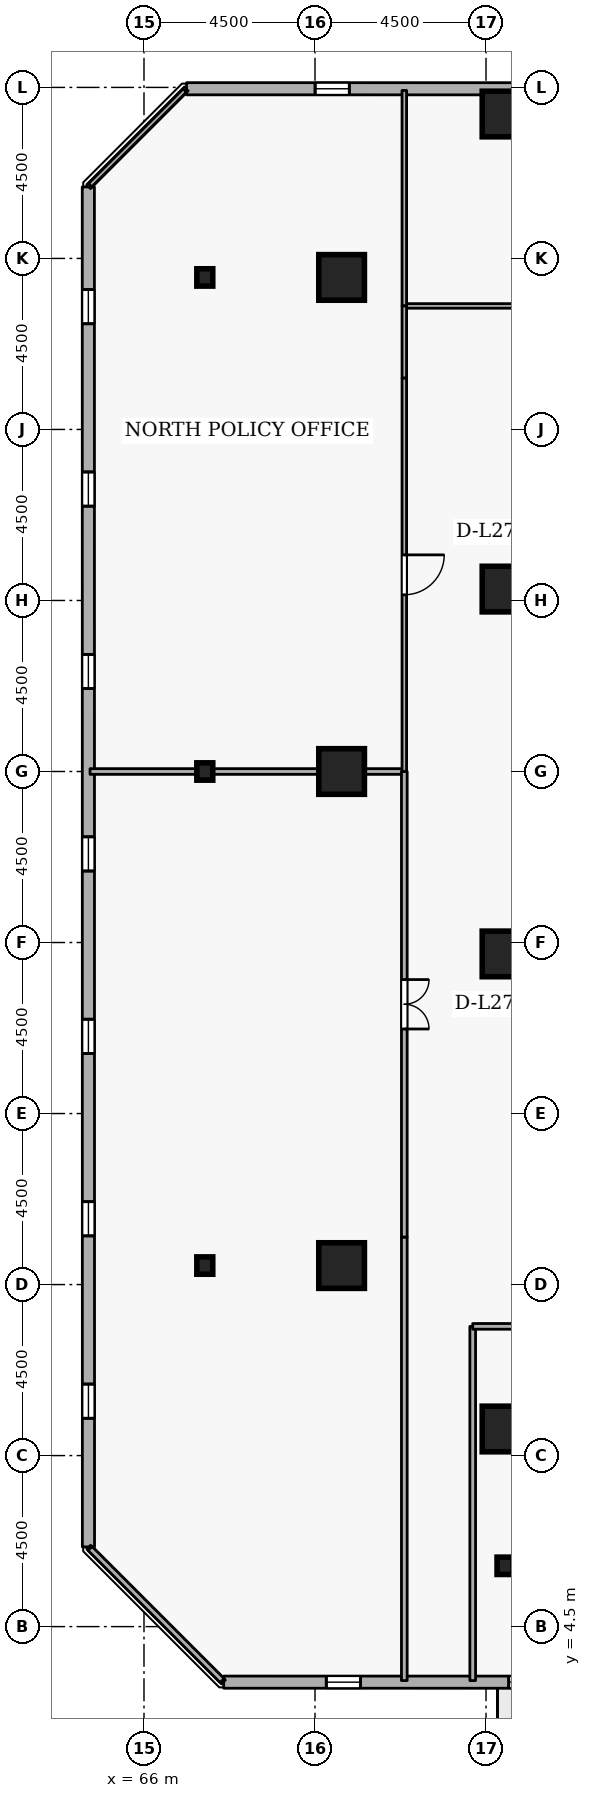
"""IFC4 building model, lengths in metres.
Left out: names, types, materials, properties, quantities, classifications, styles, units other than length and angle.
Written with IfcOpenShell. Run it as: python <this file> out.ifc"""

import sys

from ifc_helpers import new_model, si_unit, direction, frame, frame_2d, origin, origin_2d, place, context, subcontext, project, spatial, rectangle, i_section, extrude, element, fill, save


model = new_model("IFC4")
c1 = context("Model", 3, precision=1e-05, world=origin(), true_north=direction((0.0, 1.0)))
c2 = subcontext(c1, "Body", "Model", "MODEL_VIEW")
j1 = project(units=[si_unit("LENGTHUNIT", "METRE"), si_unit("PLANEANGLEUNIT", "RADIAN")], contexts=[c1])
p1 = place(None, origin())
s1 = spatial("IfcSite", under=j1, at=p1, CompositionType="ELEMENT")
p2 = place(p1, origin())
s2 = spatial("IfcBuilding", under=s1, at=p2, CompositionType="ELEMENT")
p3 = place(p2, frame((0.0, 0.0, 105.3)))
s3 = spatial("IfcBuildingStorey", under=s2, at=p3, CompositionType="ELEMENT", Elevation=105.3)
for number, where, z_axis, x_axis in (
    (1, (75.5, 44.3, 0.0), (0.0, 0.0, 1.0), (1.0, 0.0, 0.0)),
    (2, (71.2, 14.0, 0.0), (0.0, 0.0, 1.0), (1.0, 0.0, 0.0)),
    (3, (71.2, 27.0, 0.0), (0.0, 0.0, 1.0), (1.0, 0.0, 0.0)),
    (4, (71.2, 40.0, 0.0), (0.0, 0.0, 1.0), (1.0, 0.0, 0.0)),
    (5, (75.5, 9.7, 0.0), (0.0, 0.0, 1.0), (1.0, 0.0, 0.0)),
    (6, (75.5, 22.2, 0.0), (0.0, 0.0, 1.0), (1.0, 0.0, 0.0)),
    (7, (75.5, 31.8, 0.0), (0.0, 0.0, 1.0), (1.0, 0.0, 0.0)),
):
    element("IfcColumn", number, at=place(p3, frame(where, z_axis=z_axis, x_axis=x_axis)), inside=s3, PredefinedType="COLUMN", context=c2, shape_type="SweptSolid", body=[
        extrude(rectangle(XDim=1.2, YDim=1.2, at=origin_2d()), origin(), (0.0, 0.0, 1.0), 3.6),
    ])
for number, where, z_axis, x_axis in (
    (8, (67.6, 14.0, 0.0), (0.0, 0.0, 1.0), (1.0, 0.0, 0.0)),
    (9, (67.6, 27.0, 0.0), (0.0, 0.0, 1.0), (1.0, 0.0, 0.0)),
    (10, (67.6, 40.0, 0.0), (0.0, 0.0, 1.0), (1.0, 0.0, 0.0)),
    (11, (75.5, 6.1, 0.0), (0.0, 0.0, 1.0), (1.0, 0.0, 0.0)),
):
    element("IfcColumn", number, at=place(p3, frame(where, z_axis=z_axis, x_axis=x_axis)), inside=s3, PredefinedType="COLUMN", context=c2, shape_type="SweptSolid", body=[
        extrude(i_section(OverallWidth=0.418, OverallDepth=0.456, WebThickness=0.042, FlangeThickness=0.067, FilletRadius=0.015, at=origin_2d()), origin(), (0.0, 0.0, 1.0), 3.6),
    ])
p4 = place(p3, frame((68.097, 3.039, 0.0), z_axis=(0.0, 0.0, 1.0), x_axis=(0.999999996067, -8.8693006e-05, 0.0)))
e12 = element("IfcWall", 12, at=p4, inside=s3, PredefinedType="STANDARD", context=c2, shape_type="SweptSolid", body=[
    extrude(rectangle(XDim=35.784, YDim=0.32, at=frame_2d((17.892, 0.0))), origin(), (0.0, 0.0, 1.0), 2.7),
])
p5 = place(p4, frame((18.792, 0.0, 0.0)))
e13 = element("IfcOpeningElement", 13, at=p5, cuts=e12, PredefinedType="OPENING", context=c2, shape_type="SweptSolid", body=[
    extrude(rectangle(XDim=1.0, YDim=2.08, at=frame_2d((0.5, 1.04))), frame((0.0, 0.17, 0.0), z_axis=(0.0, -1.0, 0.0), x_axis=(1.0, 0.0, 0.0)), (0.0, 0.0, 1.0), 0.34),
])
p6 = place(p4, frame((2.7, 0.0, 0.72)))
e14 = element("IfcOpeningElement", 14, at=p6, cuts=e12, PredefinedType="OPENING", context=c2, shape_type="SweptSolid", body=[
    extrude(rectangle(XDim=0.9, YDim=1.75, at=frame_2d((0.45, 0.875))), frame((0.0, 0.17, 0.0), z_axis=(0.0, -1.0, 0.0), x_axis=(1.0, 0.0, 0.0)), (0.0, 0.0, 1.0), 0.34),
])
p7 = place(p4, frame((7.5, 0.0, 0.72)))
e15 = element("IfcOpeningElement", 15, at=p7, cuts=e12, PredefinedType="OPENING", context=c2, shape_type="SweptSolid", body=[
    extrude(rectangle(XDim=0.9, YDim=1.75, at=frame_2d((0.45, 0.875))), frame((0.0, 0.17, 0.0), z_axis=(0.0, -1.0, 0.0), x_axis=(1.0, 0.0, 0.0)), (0.0, 0.0, 1.0), 0.34),
])
p8 = place(p4, frame((12.3, 0.0, 0.72)))
e16 = element("IfcOpeningElement", 16, at=p8, cuts=e12, PredefinedType="OPENING", context=c2, shape_type="SweptSolid", body=[
    extrude(rectangle(XDim=0.9, YDim=1.75, at=frame_2d((0.45, 0.875))), frame((0.0, 0.17, 0.0), z_axis=(0.0, -1.0, 0.0), x_axis=(1.0, 0.0, 0.0)), (0.0, 0.0, 1.0), 0.34),
])
p9 = place(p4, frame((17.1, 0.0, 0.72)))
e17 = element("IfcOpeningElement", 17, at=p9, cuts=e12, PredefinedType="OPENING", context=c2, shape_type="SweptSolid", body=[
    extrude(rectangle(XDim=0.9, YDim=1.75, at=frame_2d((0.45, 0.875))), frame((0.0, 0.17, 0.0), z_axis=(0.0, -1.0, 0.0), x_axis=(1.0, 0.0, 0.0)), (0.0, 0.0, 1.0), 0.34),
])
p10 = place(p4, frame((21.9, 0.0, 0.72)))
e18 = element("IfcOpeningElement", 18, at=p10, cuts=e12, PredefinedType="OPENING", context=c2, shape_type="SweptSolid", body=[
    extrude(rectangle(XDim=0.9, YDim=1.75, at=frame_2d((0.45, 0.875))), frame((0.0, 0.17, 0.0), z_axis=(0.0, -1.0, 0.0), x_axis=(1.0, 0.0, 0.0)), (0.0, 0.0, 1.0), 0.34),
])
p11 = place(p4, frame((26.7, 0.0, 0.72)))
e19 = element("IfcOpeningElement", 19, at=p11, cuts=e12, PredefinedType="OPENING", context=c2, shape_type="SweptSolid", body=[
    extrude(rectangle(XDim=0.9, YDim=1.75, at=frame_2d((0.45, 0.875))), frame((0.0, 0.17, 0.0), z_axis=(0.0, -1.0, 0.0), x_axis=(1.0, 0.0, 0.0)), (0.0, 0.0, 1.0), 0.34),
])
p12 = place(p4, frame((31.5, 0.0, 0.72)))
e20 = element("IfcOpeningElement", 20, at=p12, cuts=e12, PredefinedType="OPENING", context=c2, shape_type="SweptSolid", body=[
    extrude(rectangle(XDim=0.9, YDim=1.75, at=frame_2d((0.45, 0.875))), frame((0.0, 0.17, 0.0), z_axis=(0.0, -1.0, 0.0), x_axis=(1.0, 0.0, 0.0)), (0.0, 0.0, 1.0), 0.34),
])
p13 = place(p3, frame((102.903, 44.961, 0.0), z_axis=(0.0, 0.0, 1.0), x_axis=(-0.999999996067, 8.8693006e-05, 0.0)))
e21 = element("IfcWall", 21, at=p13, inside=s3, PredefinedType="STANDARD", context=c2, shape_type="SweptSolid", body=[
    extrude(rectangle(XDim=35.784, YDim=0.32, at=frame_2d((17.892, 0.0))), origin(), (0.0, 0.0, 1.0), 2.7),
])
p14 = place(p13, frame((2.7, 0.0, 0.72)))
e22 = element("IfcOpeningElement", 22, at=p14, cuts=e21, PredefinedType="OPENING", context=c2, shape_type="SweptSolid", body=[
    extrude(rectangle(XDim=0.9, YDim=1.75, at=frame_2d((0.45, 0.875))), frame((0.0, 0.17, 0.0), z_axis=(0.0, -1.0, 0.0), x_axis=(1.0, 0.0, 0.0)), (0.0, 0.0, 1.0), 0.34),
])
p15 = place(p13, frame((7.5, 0.0, 0.72)))
e23 = element("IfcOpeningElement", 23, at=p15, cuts=e21, PredefinedType="OPENING", context=c2, shape_type="SweptSolid", body=[
    extrude(rectangle(XDim=0.9, YDim=1.75, at=frame_2d((0.45, 0.875))), frame((0.0, 0.17, 0.0), z_axis=(0.0, -1.0, 0.0), x_axis=(1.0, 0.0, 0.0)), (0.0, 0.0, 1.0), 0.34),
])
p16 = place(p13, frame((12.3, 0.0, 0.72)))
e24 = element("IfcOpeningElement", 24, at=p16, cuts=e21, PredefinedType="OPENING", context=c2, shape_type="SweptSolid", body=[
    extrude(rectangle(XDim=0.9, YDim=1.75, at=frame_2d((0.45, 0.875))), frame((0.0, 0.17, 0.0), z_axis=(0.0, -1.0, 0.0), x_axis=(1.0, 0.0, 0.0)), (0.0, 0.0, 1.0), 0.34),
])
p17 = place(p13, frame((17.1, 0.0, 0.72)))
e25 = element("IfcOpeningElement", 25, at=p17, cuts=e21, PredefinedType="OPENING", context=c2, shape_type="SweptSolid", body=[
    extrude(rectangle(XDim=0.9, YDim=1.75, at=frame_2d((0.45, 0.875))), frame((0.0, 0.17, 0.0), z_axis=(0.0, -1.0, 0.0), x_axis=(1.0, 0.0, 0.0)), (0.0, 0.0, 1.0), 0.34),
])
p18 = place(p13, frame((21.9, 0.0, 0.72)))
e26 = element("IfcOpeningElement", 26, at=p18, cuts=e21, PredefinedType="OPENING", context=c2, shape_type="SweptSolid", body=[
    extrude(rectangle(XDim=0.9, YDim=1.75, at=frame_2d((0.45, 0.875))), frame((0.0, 0.17, 0.0), z_axis=(0.0, -1.0, 0.0), x_axis=(1.0, 0.0, 0.0)), (0.0, 0.0, 1.0), 0.34),
])
p19 = place(p13, frame((31.5, 0.0, 0.72)))
e27 = element("IfcOpeningElement", 27, at=p19, cuts=e21, PredefinedType="OPENING", context=c2, shape_type="SweptSolid", body=[
    extrude(rectangle(XDim=0.9, YDim=1.75, at=frame_2d((0.45, 0.875))), frame((0.0, 0.17, 0.0), z_axis=(0.0, -1.0, 0.0), x_axis=(1.0, 0.0, 0.0)), (0.0, 0.0, 1.0), 0.34),
])
p20 = place(p3, frame((64.535, 42.381, 0.0), z_axis=(0.0, 0.0, 1.0), x_axis=(8.8693006e-05, -0.999999996067, 0.0)))
e28 = element("IfcWall", 28, at=p20, inside=s3, PredefinedType="STANDARD", context=c2, shape_type="SweptSolid", body=[
    extrude(rectangle(XDim=35.784, YDim=0.32, at=frame_2d((17.892, 0.0))), origin(), (0.0, 0.0, 1.0), 2.7),
])
p21 = place(p20, frame((2.7, 0.0, 0.72)))
e29 = element("IfcOpeningElement", 29, at=p21, cuts=e28, PredefinedType="OPENING", context=c2, shape_type="SweptSolid", body=[
    extrude(rectangle(XDim=0.9, YDim=1.75, at=frame_2d((0.45, 0.875))), frame((0.0, 0.17, 0.0), z_axis=(0.0, -1.0, 0.0), x_axis=(1.0, 0.0, 0.0)), (0.0, 0.0, 1.0), 0.34),
])
p22 = place(p20, frame((7.5, 0.0, 0.72)))
e30 = element("IfcOpeningElement", 30, at=p22, cuts=e28, PredefinedType="OPENING", context=c2, shape_type="SweptSolid", body=[
    extrude(rectangle(XDim=0.9, YDim=1.75, at=frame_2d((0.45, 0.875))), frame((0.0, 0.17, 0.0), z_axis=(0.0, -1.0, 0.0), x_axis=(1.0, 0.0, 0.0)), (0.0, 0.0, 1.0), 0.34),
])
p23 = place(p20, frame((12.3, 0.0, 0.72)))
e31 = element("IfcOpeningElement", 31, at=p23, cuts=e28, PredefinedType="OPENING", context=c2, shape_type="SweptSolid", body=[
    extrude(rectangle(XDim=0.9, YDim=1.75, at=frame_2d((0.45, 0.875))), frame((0.0, 0.17, 0.0), z_axis=(0.0, -1.0, 0.0), x_axis=(1.0, 0.0, 0.0)), (0.0, 0.0, 1.0), 0.34),
])
p24 = place(p20, frame((17.1, 0.0, 0.72)))
e32 = element("IfcOpeningElement", 32, at=p24, cuts=e28, PredefinedType="OPENING", context=c2, shape_type="SweptSolid", body=[
    extrude(rectangle(XDim=0.9, YDim=1.75, at=frame_2d((0.45, 0.875))), frame((0.0, 0.17, 0.0), z_axis=(0.0, -1.0, 0.0), x_axis=(1.0, 0.0, 0.0)), (0.0, 0.0, 1.0), 0.34),
])
p25 = place(p20, frame((21.9, 0.0, 0.72)))
e33 = element("IfcOpeningElement", 33, at=p25, cuts=e28, PredefinedType="OPENING", context=c2, shape_type="SweptSolid", body=[
    extrude(rectangle(XDim=0.9, YDim=1.75, at=frame_2d((0.45, 0.875))), frame((0.0, 0.17, 0.0), z_axis=(0.0, -1.0, 0.0), x_axis=(1.0, 0.0, 0.0)), (0.0, 0.0, 1.0), 0.34),
])
p26 = place(p20, frame((26.7, 0.0, 0.72)))
e34 = element("IfcOpeningElement", 34, at=p26, cuts=e28, PredefinedType="OPENING", context=c2, shape_type="SweptSolid", body=[
    extrude(rectangle(XDim=0.9, YDim=1.75, at=frame_2d((0.45, 0.875))), frame((0.0, 0.17, 0.0), z_axis=(0.0, -1.0, 0.0), x_axis=(1.0, 0.0, 0.0)), (0.0, 0.0, 1.0), 0.34),
])
p27 = place(p20, frame((31.5, 0.0, 0.72)))
e35 = element("IfcOpeningElement", 35, at=p27, cuts=e28, PredefinedType="OPENING", context=c2, shape_type="SweptSolid", body=[
    extrude(rectangle(XDim=0.9, YDim=1.75, at=frame_2d((0.45, 0.875))), frame((0.0, 0.17, 0.0), z_axis=(0.0, -1.0, 0.0), x_axis=(1.0, 0.0, 0.0)), (0.0, 0.0, 1.0), 0.34),
])
p28 = place(p3, frame((74.65, 3.08, 0.0), z_axis=(0.0, 0.0, 1.0), x_axis=(0.0, 1.0, 0.0)))
e36 = element("IfcWall", 36, at=p28, inside=s3, PredefinedType="PARTITIONING", context=c2, shape_type="SweptSolid", body=[
    extrude(rectangle(XDim=9.32, YDim=0.15, at=frame_2d((4.66, 0.0))), origin(), (0.0, 0.0, 1.0), 3.34),
])
p29 = place(p3, frame((74.65, 12.4, 0.0), z_axis=(0.0, 0.0, 1.0), x_axis=(1.0, 0.0, 0.0)))
e37 = element("IfcWall", 37, at=p29, inside=s3, PredefinedType="PARTITIONING", context=c2, shape_type="SweptSolid", body=[
    extrude(rectangle(XDim=4.802, YDim=0.15, at=frame_2d((2.401, 0.0))), origin(), (0.0, 0.0, 1.0), 3.34),
])
p30 = place(p3, frame((82.2, 39.25, 0.0), z_axis=(0.0, 0.0, 1.0), x_axis=(-1.0, 0.0, 0.0)))
e38 = element("IfcWall", 38, at=p30, inside=s3, PredefinedType="PARTITIONING", context=c2, shape_type="SweptSolid", body=[
    extrude(rectangle(XDim=9.35, YDim=0.12, at=frame_2d((4.675, 0.0))), origin(), (0.0, 0.0, 1.0), 3.34),
])
p31 = place(p30, frame((4.15, 0.0, 0.0)))
e39 = element("IfcOpeningElement", 39, at=p31, cuts=e38, PredefinedType="OPENING", context=c2, shape_type="SweptSolid", body=[
    extrude(rectangle(XDim=1.05, YDim=2.1, at=frame_2d((0.525, 1.05))), frame((0.0, 0.07, 0.0), z_axis=(0.0, -1.0, 0.0), x_axis=(1.0, 0.0, 0.0)), (0.0, 0.0, 1.0), 0.14),
])
p32 = place(p3, frame((72.85, 39.25, 0.0), z_axis=(0.0, 0.0, 1.0), x_axis=(0.0, 1.0, 0.0)))
e40 = element("IfcWall", 40, at=p32, inside=s3, PredefinedType="PARTITIONING", context=c2, shape_type="SweptSolid", body=[
    extrude(rectangle(XDim=5.67, YDim=0.12, at=frame_2d((2.835, 0.0))), origin(), (0.0, 0.0, 1.0), 3.34),
])
p33 = place(p3, frame((72.85, 14.75, 0.0), z_axis=(0.0, 0.0, 1.0), x_axis=(0.0, -1.0, 0.0)))
e41 = element("IfcWall", 41, at=p33, inside=s3, PredefinedType="PARTITIONING", context=c2, shape_type="SweptSolid", body=[
    extrude(rectangle(XDim=11.67, YDim=0.15, at=frame_2d((5.835, 0.0))), origin(), (0.0, 0.0, 1.0), 3.34),
])
p34 = place(p3, frame((68.057, 3.08, 0.0), z_axis=(0.0, 0.0, 1.0), x_axis=(-0.707106781187, 0.707106781187, 0.0)))
e42 = element("IfcWall", 42, at=p34, inside=s3, PredefinedType="PARTITIONING", context=c2, shape_type="SweptSolid", body=[
    extrude(rectangle(XDim=4.917, YDim=0.15, at=frame_2d((2.458, 0.0))), origin(), (0.0, 0.0, 1.0), 3.34),
])
p35 = place(p3, frame((64.58, 27.0, 0.0), z_axis=(0.0, 0.0, 1.0), x_axis=(1.0, 0.0, 0.0)))
e43 = element("IfcWall", 43, at=p35, inside=s3, PredefinedType="PARTITIONING", context=c2, shape_type="SweptSolid", body=[
    extrude(rectangle(XDim=8.27, YDim=0.15, at=frame_2d((4.135, 0.0))), origin(), (0.0, 0.0, 1.0), 2.878),
])
p36 = place(p3, frame((72.85, 27.0, 0.0), z_axis=(0.0, 0.0, 1.0), x_axis=(0.0, -1.0, 0.0)))
e44 = element("IfcWall", 44, at=p36, inside=s3, PredefinedType="PARTITIONING", context=c2, shape_type="SweptSolid", body=[
    extrude(rectangle(XDim=12.25, YDim=0.15, at=frame_2d((6.125, 0.0))), origin(), (0.0, 0.0, 1.0), 3.34),
])
p37 = place(p36, frame((5.475, 0.0, 0.0)))
e45 = element("IfcOpeningElement", 45, at=p37, cuts=e44, PredefinedType="OPENING", context=c2, shape_type="SweptSolid", body=[
    extrude(rectangle(XDim=1.3, YDim=2.12, at=frame_2d((0.65, 1.06))), frame((0.0, 0.085, 0.0), z_axis=(0.0, -1.0, 0.0), x_axis=(1.0, 0.0, 0.0)), (0.0, 0.0, 1.0), 0.17),
])
p38 = place(p3, frame((64.58, 42.425, 0.0), z_axis=(0.0, 0.0, 1.0), x_axis=(0.707106781187, 0.707106781187, 0.0)))
e46 = element("IfcWall", 46, at=p38, inside=s3, PredefinedType="PARTITIONING", context=c2, shape_type="SweptSolid", body=[
    extrude(rectangle(XDim=3.528, YDim=0.12, at=frame_2d((1.764, 0.0))), origin(), (0.0, 0.0, 1.0), 3.34),
])
p39 = place(p3, frame((72.85, 39.25, 0.0), z_axis=(0.0, 0.0, 1.0), x_axis=(0.0, -1.0, 0.0)))
e47 = element("IfcWall", 47, at=p39, inside=s3, PredefinedType="PARTITIONING", context=c2, shape_type="SweptSolid", body=[
    extrude(rectangle(XDim=1.9, YDim=0.12, at=frame_2d((0.95, 0.0))), origin(), (0.0, 0.0, 1.0), 3.34),
])
p40 = place(p3, frame((72.85, 37.35, 0.0), z_axis=(0.0, 0.0, 1.0), x_axis=(0.0, -1.0, 0.0)))
e48 = element("IfcWall", 48, at=p40, inside=s3, PredefinedType="PARTITIONING", context=c2, shape_type="SweptSolid", body=[
    extrude(rectangle(XDim=10.35, YDim=0.12, at=frame_2d((5.175, 0.0))), origin(), (0.0, 0.0, 1.0), 2.895),
])
p41 = place(p40, frame((4.65, 0.0, 0.0)))
e49 = element("IfcOpeningElement", 49, at=p41, cuts=e48, PredefinedType="OPENING", context=c2, shape_type="SweptSolid", body=[
    extrude(rectangle(XDim=1.05, YDim=2.1, at=frame_2d((0.525, 1.05))), frame((0.0, 0.07, 0.0), z_axis=(0.0, -1.0, 0.0), x_axis=(1.0, 0.0, 0.0)), (0.0, 0.0, 1.0), 0.14),
])
p42 = place(p6, origin())
e50 = element("IfcWindow", 50, at=p42, inside=s3, PartitioningType="SINGLE_PANEL", PredefinedType="WINDOW", context=c2, shape_type="SweptSolid", body=[
    extrude(rectangle(XDim=0.9, YDim=1.75, at=frame_2d((0.45, 0.875))), frame((0.0, 0.03, 0.0), z_axis=(0.0, -1.0, 0.0), x_axis=(1.0, 0.0, 0.0)), (0.0, 0.0, 1.0), 0.06),
])
fill(e14, e50)
p43 = place(p7, origin())
e51 = element("IfcWindow", 51, at=p43, inside=s3, PartitioningType="SINGLE_PANEL", PredefinedType="WINDOW", context=c2, shape_type="SweptSolid", body=[
    extrude(rectangle(XDim=0.9, YDim=1.75, at=frame_2d((0.45, 0.875))), frame((0.0, 0.03, 0.0), z_axis=(0.0, -1.0, 0.0), x_axis=(1.0, 0.0, 0.0)), (0.0, 0.0, 1.0), 0.06),
])
fill(e15, e51)
p44 = place(p19, origin())
e52 = element("IfcWindow", 52, at=p44, inside=s3, PartitioningType="SINGLE_PANEL", PredefinedType="WINDOW", context=c2, shape_type="SweptSolid", body=[
    extrude(rectangle(XDim=0.9, YDim=1.75, at=frame_2d((0.45, 0.875))), frame((0.0, 0.03, 0.0), z_axis=(0.0, -1.0, 0.0), x_axis=(1.0, 0.0, 0.0)), (0.0, 0.0, 1.0), 0.06),
])
fill(e27, e52)
p45 = place(p21, origin())
e53 = element("IfcWindow", 53, at=p45, inside=s3, PartitioningType="SINGLE_PANEL", PredefinedType="WINDOW", context=c2, shape_type="SweptSolid", body=[
    extrude(rectangle(XDim=0.9, YDim=1.75, at=frame_2d((0.45, 0.875))), frame((0.0, 0.03, 0.0), z_axis=(0.0, -1.0, 0.0), x_axis=(1.0, 0.0, 0.0)), (0.0, 0.0, 1.0), 0.06),
])
fill(e29, e53)
p46 = place(p22, origin())
e54 = element("IfcWindow", 54, at=p46, inside=s3, PartitioningType="SINGLE_PANEL", PredefinedType="WINDOW", context=c2, shape_type="SweptSolid", body=[
    extrude(rectangle(XDim=0.9, YDim=1.75, at=frame_2d((0.45, 0.875))), frame((0.0, 0.03, 0.0), z_axis=(0.0, -1.0, 0.0), x_axis=(1.0, 0.0, 0.0)), (0.0, 0.0, 1.0), 0.06),
])
fill(e30, e54)
p47 = place(p23, origin())
e55 = element("IfcWindow", 55, at=p47, inside=s3, PartitioningType="SINGLE_PANEL", PredefinedType="WINDOW", context=c2, shape_type="SweptSolid", body=[
    extrude(rectangle(XDim=0.9, YDim=1.75, at=frame_2d((0.45, 0.875))), frame((0.0, 0.03, 0.0), z_axis=(0.0, -1.0, 0.0), x_axis=(1.0, 0.0, 0.0)), (0.0, 0.0, 1.0), 0.06),
])
fill(e31, e55)
p48 = place(p24, origin())
e56 = element("IfcWindow", 56, at=p48, inside=s3, PartitioningType="SINGLE_PANEL", PredefinedType="WINDOW", context=c2, shape_type="SweptSolid", body=[
    extrude(rectangle(XDim=0.9, YDim=1.75, at=frame_2d((0.45, 0.875))), frame((0.0, 0.03, 0.0), z_axis=(0.0, -1.0, 0.0), x_axis=(1.0, 0.0, 0.0)), (0.0, 0.0, 1.0), 0.06),
])
fill(e32, e56)
p49 = place(p25, origin())
e57 = element("IfcWindow", 57, at=p49, inside=s3, PartitioningType="SINGLE_PANEL", PredefinedType="WINDOW", context=c2, shape_type="SweptSolid", body=[
    extrude(rectangle(XDim=0.9, YDim=1.75, at=frame_2d((0.45, 0.875))), frame((0.0, 0.03, 0.0), z_axis=(0.0, -1.0, 0.0), x_axis=(1.0, 0.0, 0.0)), (0.0, 0.0, 1.0), 0.06),
])
fill(e33, e57)
p50 = place(p26, origin())
e58 = element("IfcWindow", 58, at=p50, inside=s3, PartitioningType="SINGLE_PANEL", PredefinedType="WINDOW", context=c2, shape_type="SweptSolid", body=[
    extrude(rectangle(XDim=0.9, YDim=1.75, at=frame_2d((0.45, 0.875))), frame((0.0, 0.03, 0.0), z_axis=(0.0, -1.0, 0.0), x_axis=(1.0, 0.0, 0.0)), (0.0, 0.0, 1.0), 0.06),
])
fill(e34, e58)
p51 = place(p27, origin())
e59 = element("IfcWindow", 59, at=p51, inside=s3, PartitioningType="SINGLE_PANEL", PredefinedType="WINDOW", context=c2, shape_type="SweptSolid", body=[
    extrude(rectangle(XDim=0.9, YDim=1.75, at=frame_2d((0.45, 0.875))), frame((0.0, 0.03, 0.0), z_axis=(0.0, -1.0, 0.0), x_axis=(1.0, 0.0, 0.0)), (0.0, 0.0, 1.0), 0.06),
])
fill(e35, e59)
p52 = place(p37, origin())
e60 = element("IfcDoor", 60, at=p52, inside=s3, OperationType="DOUBLE_DOOR_SINGLE_SWING", PredefinedType="DOOR", context=c2, shape_type="SweptSolid", body=[
    extrude(rectangle(XDim=1.3, YDim=2.12, at=frame_2d((0.65, 1.06))), frame((0.0, 0.025, 0.0), z_axis=(0.0, -1.0, 0.0), x_axis=(1.0, 0.0, 0.0)), (0.0, 0.0, 1.0), 0.05),
])
fill(e45, e60)
p53 = place(p41, origin())
e61 = element("IfcDoor", 61, at=p53, inside=s3, OperationType="SINGLE_SWING_LEFT", PredefinedType="DOOR", context=c2, shape_type="SweptSolid", body=[
    extrude(rectangle(XDim=1.05, YDim=2.1, at=frame_2d((0.525, 1.05))), frame((0.0, 0.025, 0.0), z_axis=(0.0, -1.0, 0.0), x_axis=(1.0, 0.0, 0.0)), (0.0, 0.0, 1.0), 0.05),
])
fill(e49, e61)
save(model, sys.argv[1])
